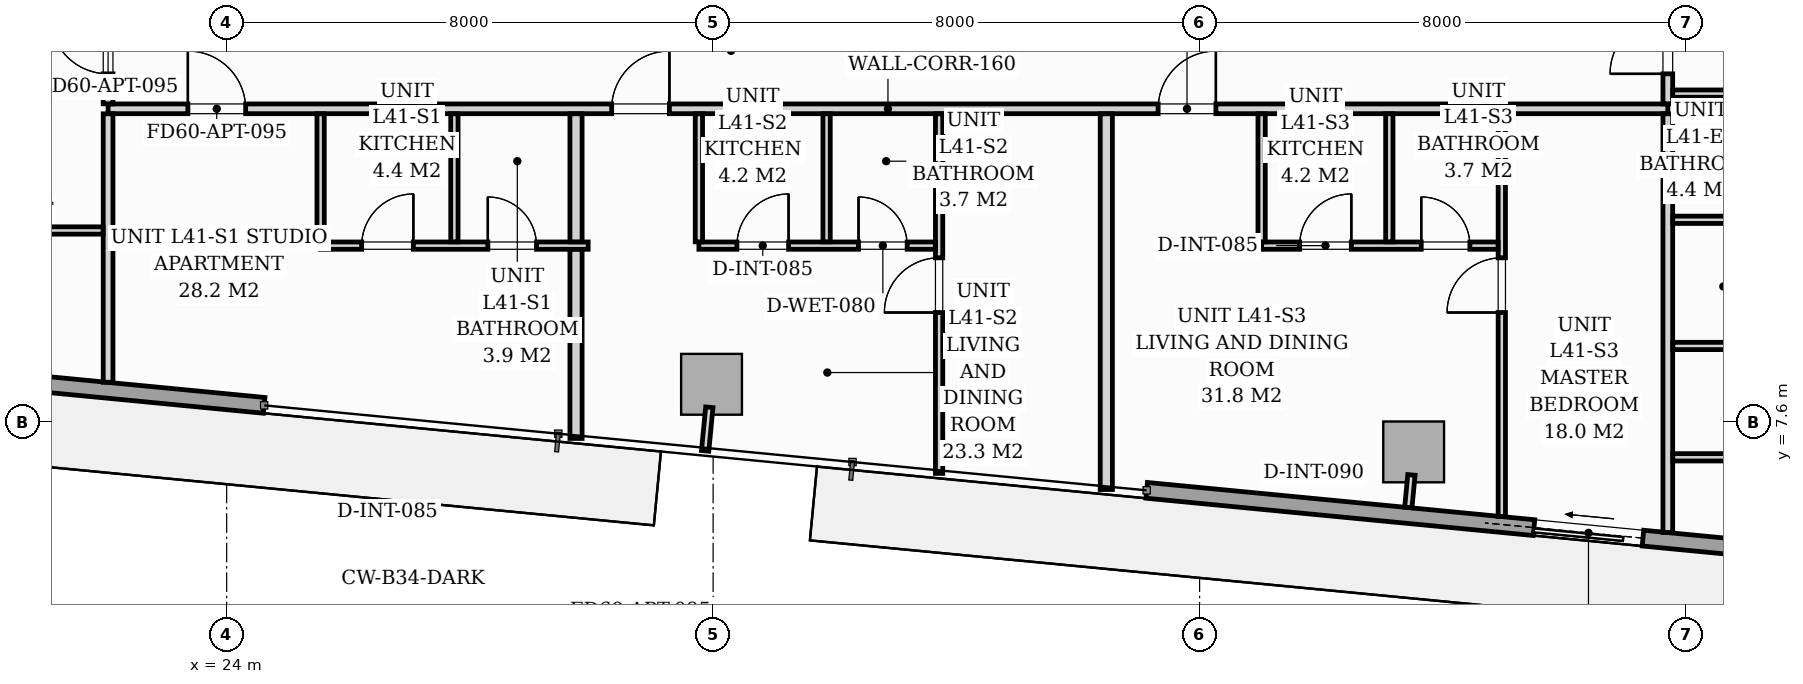
"""IFC4 building model, lengths in metres.
Left out: names, types, materials, properties, quantities, classifications, styles, units other than length and angle.
Written with IfcOpenShell. Run it as: python <this file> out.ifc"""

import sys

from ifc_helpers import new_model, si_unit, direction, frame, frame_2d, origin, origin_2d, place, context, subcontext, project, spatial, rectangle, extrude, source, transform, mapped, element, fill, save


model = new_model("IFC4")
c1 = context("Model", 3, precision=1e-05, world=origin(), true_north=direction((0.0, 1.0)))
c2 = subcontext(c1, "Body", "Model", "MODEL_VIEW")
j1 = project(units=[si_unit("LENGTHUNIT", "METRE"), si_unit("PLANEANGLEUNIT", "RADIAN")], contexts=[c1])
p1 = place(None, origin())
s1 = spatial("IfcSite", under=j1, at=p1, CompositionType="ELEMENT")
p2 = place(p1, origin())
s2 = spatial("IfcBuilding", under=s1, at=p2, CompositionType="ELEMENT")
p3 = place(p2, frame((0.0, 0.0, 143.8)))
s3 = spatial("IfcBuildingStorey", under=s2, at=p3, CompositionType="ELEMENT", Elevation=143.8)
m1 = source(origin(), c2, "Body", "SweptSolid", [
    extrude(rectangle(XDim=1.0, YDim=1.0, at=origin_2d()), origin(), (0.0, 0.0, 1.0), 3.196),
])
for number, where, z_axis, x_axis in (
    (1, (31.974, 8.22, 0.002), (0.0, 0.0, 1.0), (0.995, -0.096, 0.0)),
    (2, (43.521, 7.108, 0.002), (0.0, 0.0, 1.0), (0.995, -0.096, 0.0)),
):
    element("IfcColumn", number, at=place(p3, frame(where, z_axis=z_axis, x_axis=x_axis)), inside=s3, PredefinedType="COLUMN", context=c2, shape_type="MappedRepresentation", body=[
        mapped(m1, transform((0.0, 0.0, 0.0), scale=1.0)),
    ])
p4 = place(p3, frame((56.061, 4.845, 0.0), z_axis=(0.0, 0.0, 1.0), x_axis=(-0.995395976631, 0.095848055311, 0.0)))
e3 = element("IfcWall", 3, at=p4, inside=s3, PredefinedType="STANDARD", context=c2, shape_type="SweptSolid", body=[
    extrude(rectangle(XDim=17.01, YDim=0.26, at=frame_2d((8.505, 0.0))), origin(), (0.0, 0.0, 1.0), 2.94),
])
p5 = place(p4, frame((8.811, 0.0, 0.0)))
e4 = element("IfcOpeningElement", 4, at=p5, cuts=e3, PredefinedType="OPENING", context=c2, shape_type="SweptSolid", body=[
    extrude(rectangle(XDim=1.8, YDim=2.06, at=frame_2d((0.9, 1.03))), frame((0.0, 0.14, 0.0), z_axis=(0.0, -1.0, 0.0), x_axis=(1.0, 0.0, 0.0)), (0.0, 0.0, 1.0), 0.28),
])
p6 = place(p4, frame((2.05, 0.0, 0.65)))
e5 = element("IfcOpeningElement", 5, at=p6, cuts=e3, PredefinedType="OPENING", context=c2, shape_type="SweptSolid", body=[
    extrude(rectangle(XDim=1.6, YDim=1.5, at=frame_2d((0.8, 0.75))), frame((0.0, 0.14, 0.0), z_axis=(0.0, -1.0, 0.0), x_axis=(1.0, 0.0, 0.0)), (0.0, 0.0, 1.0), 0.28),
])
p7 = place(p3, frame((24.617, 7.873, 0.0), z_axis=(0.0, 0.0, 1.0), x_axis=(-0.995395976631, 0.095848055311, 0.0)))
e6 = element("IfcWall", 6, at=p7, inside=s3, PredefinedType="STANDARD", context=c2, shape_type="SweptSolid", body=[
    extrude(rectangle(XDim=17.01, YDim=0.26, at=frame_2d((8.505, 0.0))), origin(), (0.0, 0.0, 1.0), 2.94),
])
p8 = place(p7, frame((7.21, 0.0, 0.0)))
e7 = element("IfcOpeningElement", 7, at=p8, cuts=e6, PredefinedType="OPENING", context=c2, shape_type="SweptSolid", body=[
    extrude(rectangle(XDim=1.8, YDim=2.06, at=frame_2d((0.9, 1.03))), frame((0.0, 0.14, 0.0), z_axis=(0.0, -1.0, 0.0), x_axis=(1.0, 0.0, 0.0)), (0.0, 0.0, 1.0), 0.28),
])
p9 = place(p7, frame((9.7, 0.0, 0.65)))
e8 = element("IfcOpeningElement", 8, at=p9, cuts=e6, PredefinedType="OPENING", context=c2, shape_type="SweptSolid", body=[
    extrude(rectangle(XDim=1.6, YDim=1.5, at=frame_2d((0.8, 0.75))), frame((0.0, 0.14, 0.0), z_axis=(0.0, -1.0, 0.0), x_axis=(1.0, 0.0, 0.0)), (0.0, 0.0, 1.0), 0.28),
])
p10 = place(p3, frame((22.05, 12.75, 0.0), z_axis=(0.0, 0.0, 1.0), x_axis=(1.0, 0.0, 0.0)))
e9 = element("IfcWall", 9, at=p10, inside=s3, PredefinedType="PARTITIONING", context=c2, shape_type="SweptSolid", body=[
    extrude(rectangle(XDim=25.65, YDim=0.16, at=frame_2d((12.825, 0.0))), origin(), (0.0, 0.0, 1.0), 2.94),
])
p11 = place(p10, frame((1.312, 0.0, 0.0)))
e10 = element("IfcOpeningElement", 10, at=p11, cuts=e9, PredefinedType="OPENING", context=c2, shape_type="SweptSolid", body=[
    extrude(rectangle(XDim=0.95, YDim=2.06, at=frame_2d((0.475, 1.03))), frame((0.0, 0.09, 0.0), z_axis=(0.0, -1.0, 0.0), x_axis=(1.0, 0.0, 0.0)), (0.0, 0.0, 1.0), 0.18),
])
p12 = place(p10, frame((8.281, 0.0, 0.0)))
e11 = element("IfcOpeningElement", 11, at=p12, cuts=e9, PredefinedType="OPENING", context=c2, shape_type="SweptSolid", body=[
    extrude(rectangle(XDim=0.95, YDim=2.06, at=frame_2d((0.475, 1.03))), frame((0.0, 0.09, 0.0), z_axis=(0.0, -1.0, 0.0), x_axis=(1.0, 0.0, 0.0)), (0.0, 0.0, 1.0), 0.18),
])
p13 = place(p10, frame((17.268, 0.0, 0.0)))
e12 = element("IfcOpeningElement", 12, at=p13, cuts=e9, PredefinedType="OPENING", context=c2, shape_type="SweptSolid", body=[
    extrude(rectangle(XDim=0.95, YDim=2.06, at=frame_2d((0.475, 1.03))), frame((0.0, 0.09, 0.0), z_axis=(0.0, -1.0, 0.0), x_axis=(1.0, 0.0, 0.0)), (0.0, 0.0, 1.0), 0.18),
])
p14 = place(p3, frame((22.05, 8.253, 0.0), z_axis=(0.0, 0.0, 1.0), x_axis=(0.0, 1.0, 0.0)))
e13 = element("IfcWall", 13, at=p14, inside=s3, PredefinedType="PARTITIONING", context=c2, shape_type="SweptSolid", body=[
    extrude(rectangle(XDim=4.415, YDim=0.16, at=frame_2d((2.208, 0.0))), origin(), (0.0, 0.0, 1.0), 2.94),
])
p15 = place(p3, frame((22.05, 12.832, 0.0), z_axis=(0.0, 0.0, 1.0), x_axis=(0.0, 1.0, 0.0)))
e14 = element("IfcWall", 14, at=p15, inside=s3, PredefinedType="PARTITIONING", context=c2, shape_type="SweptSolid", body=[
    extrude(rectangle(XDim=14.585, YDim=0.16, at=frame_2d((7.292, 0.0))), origin(), (0.0, 0.0, 1.0), 2.94),
])
p16 = place(p15, frame((0.493, 0.0, 0.0)))
e15 = element("IfcOpeningElement", 15, at=p16, cuts=e14, PredefinedType="OPENING", context=c2, shape_type="SweptSolid", body=[
    extrude(rectangle(XDim=0.95, YDim=2.06, at=frame_2d((0.475, 1.03))), frame((0.0, 0.09, 0.0), z_axis=(0.0, -1.0, 0.0), x_axis=(1.0, 0.0, 0.0)), (0.0, 0.0, 1.0), 0.18),
])
p17 = place(p3, frame((47.7, 5.783, 0.0), z_axis=(0.0, 0.0, 1.0), x_axis=(0.0, 1.0, 0.0)))
e16 = element("IfcWall", 16, at=p17, inside=s3, PredefinedType="PARTITIONING", context=c2, shape_type="SweptSolid", body=[
    extrude(rectangle(XDim=6.885, YDim=0.16, at=frame_2d((3.442, 0.0))), origin(), (0.0, 0.0, 1.0), 2.94),
])
p18 = place(p3, frame((47.7, 12.832, 0.0), z_axis=(0.0, 0.0, 1.0), x_axis=(0.0, 1.0, 0.0)))
e17 = element("IfcWall", 17, at=p18, inside=s3, PredefinedType="PARTITIONING", context=c2, shape_type="SweptSolid", body=[
    extrude(rectangle(XDim=7.818, YDim=0.16, at=frame_2d((3.909, 0.0))), origin(), (0.0, 0.0, 1.0), 2.94),
])
p19 = place(p18, frame((0.493, 0.0, 0.0)))
e18 = element("IfcOpeningElement", 18, at=p19, cuts=e17, PredefinedType="OPENING", context=c2, shape_type="SweptSolid", body=[
    extrude(rectangle(XDim=0.95, YDim=2.06, at=frame_2d((0.475, 1.03))), frame((0.0, 0.09, 0.0), z_axis=(0.0, -1.0, 0.0), x_axis=(1.0, 0.0, 0.0)), (0.0, 0.0, 1.0), 0.18),
])
p20 = place(p18, frame((5.313, 0.0, 0.0)))
e19 = element("IfcOpeningElement", 19, at=p20, cuts=e17, PredefinedType="OPENING", context=c2, shape_type="SweptSolid", body=[
    extrude(rectangle(XDim=0.95, YDim=2.06, at=frame_2d((0.475, 1.03))), frame((0.0, 0.09, 0.0), z_axis=(0.0, -1.0, 0.0), x_axis=(1.0, 0.0, 0.0)), (0.0, 0.0, 1.0), 0.18),
])
p21 = place(p3, frame((25.545, 10.5, 0.0), z_axis=(0.0, 0.0, 1.0), x_axis=(1.0, 0.0, 0.0)))
e20 = element("IfcWall", 20, at=p21, inside=s3, PredefinedType="PARTITIONING", context=c2, shape_type="SweptSolid", body=[
    extrude(rectangle(XDim=4.4, YDim=0.12, at=frame_2d((2.2, 0.0))), origin(), (0.0, 0.0, 1.0), 2.94),
])
p22 = place(p21, frame((0.675, 0.0, 0.0)))
e21 = element("IfcOpeningElement", 21, at=p22, cuts=e20, PredefinedType="OPENING", context=c2, shape_type="SweptSolid", body=[
    extrude(rectangle(XDim=0.85, YDim=2.05, at=frame_2d((0.425, 1.025))), frame((0.0, 0.07, 0.0), z_axis=(0.0, -1.0, 0.0), x_axis=(1.0, 0.0, 0.0)), (0.0, 0.0, 1.0), 0.14),
])
p23 = place(p21, frame((2.75, 0.0, 0.0)))
e22 = element("IfcOpeningElement", 22, at=p23, cuts=e20, PredefinedType="OPENING", context=c2, shape_type="SweptSolid", body=[
    extrude(rectangle(XDim=0.8, YDim=2.02, at=frame_2d((0.4, 1.01))), frame((0.0, 0.07, 0.0), z_axis=(0.0, -1.0, 0.0), x_axis=(1.0, 0.0, 0.0)), (0.0, 0.0, 1.0), 0.14),
])
for number, where, z_axis, x_axis in (
    (23, (25.545, 10.562, 0.0), (0.0, 0.0, 1.0), (0.0, 1.0, 0.0)),
    (24, (27.745, 10.562, 0.0), (0.0, 0.0, 1.0), (0.0, 1.0, 0.0)),
):
    element("IfcWall", number, at=place(p3, frame(where, z_axis=z_axis, x_axis=x_axis)), inside=s3, PredefinedType="PARTITIONING", context=c2, shape_type="SweptSolid", body=[
        extrude(rectangle(XDim=2.106, YDim=0.12, at=frame_2d((1.053, 0.0))), origin(), (0.0, 0.0, 1.0), 2.94),
    ])
p24 = place(p3, frame((29.745, 7.329, 0.0), z_axis=(0.0, 0.0, 1.0), x_axis=(0.0, 1.0, 0.0)))
e25 = element("IfcWall", 25, at=p24, inside=s3, PredefinedType="PARTITIONING", context=c2, shape_type="SweptSolid", body=[
    extrude(rectangle(XDim=3.109, YDim=0.2, at=frame_2d((1.554, 0.0))), origin(), (0.0, 0.0, 1.0), 2.94),
])
p25 = place(p3, frame((29.745, 10.562, 0.0), z_axis=(0.0, 0.0, 1.0), x_axis=(0.0, 1.0, 0.0)))
e26 = element("IfcWall", 26, at=p25, inside=s3, PredefinedType="PARTITIONING", context=c2, shape_type="SweptSolid", body=[
    extrude(rectangle(XDim=2.106, YDim=0.2, at=frame_2d((1.053, 0.0))), origin(), (0.0, 0.0, 1.0), 2.94),
])
p26 = place(p3, frame((35.716, 6.754, 0.0), z_axis=(0.0, 0.0, 1.0), x_axis=(0.0, 1.0, 0.0)))
e27 = element("IfcWall", 27, at=p26, inside=s3, PredefinedType="PARTITIONING", context=c2, shape_type="SweptSolid", body=[
    extrude(rectangle(XDim=5.914, YDim=0.12, at=frame_2d((2.957, 0.0))), origin(), (0.0, 0.0, 1.0), 2.94),
])
p27 = place(p26, frame((2.646, 0.0, 0.0)))
e28 = element("IfcOpeningElement", 28, at=p27, cuts=e27, PredefinedType="OPENING", context=c2, shape_type="SweptSolid", body=[
    extrude(rectangle(XDim=0.9, YDim=2.05, at=frame_2d((0.45, 1.025))), frame((0.0, 0.07, 0.0), z_axis=(0.0, -1.0, 0.0), x_axis=(1.0, 0.0, 0.0)), (0.0, 0.0, 1.0), 0.14),
])
p28 = place(p3, frame((31.766, 10.5, 0.0), z_axis=(0.0, 0.0, 1.0), x_axis=(1.0, 0.0, 0.0)))
e29 = element("IfcWall", 29, at=p28, inside=s3, PredefinedType="PARTITIONING", context=c2, shape_type="SweptSolid", body=[
    extrude(rectangle(XDim=3.888, YDim=0.12, at=frame_2d((1.944, 0.0))), origin(), (0.0, 0.0, 1.0), 2.94),
])
p29 = place(p28, frame((0.625, 0.0, 0.0)))
e30 = element("IfcOpeningElement", 30, at=p29, cuts=e29, PredefinedType="OPENING", context=c2, shape_type="SweptSolid", body=[
    extrude(rectangle(XDim=0.85, YDim=2.05, at=frame_2d((0.425, 1.025))), frame((0.0, 0.07, 0.0), z_axis=(0.0, -1.0, 0.0), x_axis=(1.0, 0.0, 0.0)), (0.0, 0.0, 1.0), 0.14),
])
p30 = place(p28, frame((2.625, 0.0, 0.0)))
e31 = element("IfcOpeningElement", 31, at=p30, cuts=e29, PredefinedType="OPENING", context=c2, shape_type="SweptSolid", body=[
    extrude(rectangle(XDim=0.8, YDim=2.02, at=frame_2d((0.4, 1.01))), frame((0.0, 0.07, 0.0), z_axis=(0.0, -1.0, 0.0), x_axis=(1.0, 0.0, 0.0)), (0.0, 0.0, 1.0), 0.14),
])
for number, where, z_axis, x_axis in (
    (32, (33.866, 10.562, 0.0), (0.0, 0.0, 1.0), (0.0, 1.0, 0.0)),
    (33, (31.766, 10.562, 0.0), (0.0, 0.0, 1.0), (0.0, 1.0, 0.0)),
):
    element("IfcWall", number, at=place(p3, frame(where, z_axis=z_axis, x_axis=x_axis)), inside=s3, PredefinedType="PARTITIONING", context=c2, shape_type="SweptSolid", body=[
        extrude(rectangle(XDim=2.106, YDim=0.12, at=frame_2d((1.053, 0.0))), origin(), (0.0, 0.0, 1.0), 2.94),
    ])
p31 = place(p3, frame((38.466, 6.49, 0.0), z_axis=(0.0, 0.0, 1.0), x_axis=(0.0, 1.0, 0.0)))
e34 = element("IfcWall", 34, at=p31, inside=s3, PredefinedType="PARTITIONING", context=c2, shape_type="SweptSolid", body=[
    extrude(rectangle(XDim=6.178, YDim=0.2, at=frame_2d((3.089, 0.0))), origin(), (0.0, 0.0, 1.0), 2.94),
])
p32 = place(p3, frame((44.97, 6.046, 0.0), z_axis=(0.0, 0.0, 1.0), x_axis=(0.0, 1.0, 0.0)))
e35 = element("IfcWall", 35, at=p32, inside=s3, PredefinedType="PARTITIONING", context=c2, shape_type="SweptSolid", body=[
    extrude(rectangle(XDim=6.622, YDim=0.12, at=frame_2d((3.311, 0.0))), origin(), (0.0, 0.0, 1.0), 2.94),
])
p33 = place(p32, frame((3.354, 0.0, 0.0)))
e36 = element("IfcOpeningElement", 36, at=p33, cuts=e35, PredefinedType="OPENING", context=c2, shape_type="SweptSolid", body=[
    extrude(rectangle(XDim=0.9, YDim=2.05, at=frame_2d((0.45, 1.025))), frame((0.0, 0.07, 0.0), z_axis=(0.0, -1.0, 0.0), x_axis=(1.0, 0.0, 0.0)), (0.0, 0.0, 1.0), 0.14),
])
p34 = place(p3, frame((41.02, 10.5, 0.0), z_axis=(0.0, 0.0, 1.0), x_axis=(1.0, 0.0, 0.0)))
e37 = element("IfcWall", 37, at=p34, inside=s3, PredefinedType="PARTITIONING", context=c2, shape_type="SweptSolid", body=[
    extrude(rectangle(XDim=3.888, YDim=0.12, at=frame_2d((1.944, 0.0))), origin(), (0.0, 0.0, 1.0), 2.94),
])
p35 = place(p34, frame((0.625, 0.0, 0.0)))
e38 = element("IfcOpeningElement", 38, at=p35, cuts=e37, PredefinedType="OPENING", context=c2, shape_type="SweptSolid", body=[
    extrude(rectangle(XDim=0.85, YDim=2.05, at=frame_2d((0.425, 1.025))), frame((0.0, 0.07, 0.0), z_axis=(0.0, -1.0, 0.0), x_axis=(1.0, 0.0, 0.0)), (0.0, 0.0, 1.0), 0.14),
])
p36 = place(p34, frame((2.625, 0.0, 0.0)))
e39 = element("IfcOpeningElement", 39, at=p36, cuts=e37, PredefinedType="OPENING", context=c2, shape_type="SweptSolid", body=[
    extrude(rectangle(XDim=0.8, YDim=2.02, at=frame_2d((0.4, 1.01))), frame((0.0, 0.07, 0.0), z_axis=(0.0, -1.0, 0.0), x_axis=(1.0, 0.0, 0.0)), (0.0, 0.0, 1.0), 0.14),
])
for number, where, z_axis, x_axis in (
    (40, (43.12, 10.562, 0.0), (0.0, 0.0, 1.0), (0.0, 1.0, 0.0)),
    (41, (41.02, 10.562, 0.0), (0.0, 0.0, 1.0), (0.0, 1.0, 0.0)),
):
    element("IfcWall", number, at=place(p3, frame(where, z_axis=z_axis, x_axis=x_axis)), inside=s3, PredefinedType="PARTITIONING", context=c2, shape_type="SweptSolid", body=[
        extrude(rectangle(XDim=2.106, YDim=0.12, at=frame_2d((1.053, 0.0))), origin(), (0.0, 0.0, 1.0), 2.94),
    ])
p37 = place(p3, frame((8.406, 10.749, 0.0), z_axis=(0.0, 0.0, 1.0), x_axis=(1.0, 0.0, 0.0)))
e42 = element("IfcWall", 42, at=p37, inside=s3, PredefinedType="PARTITIONING", context=c2, shape_type="SweptSolid", body=[
    extrude(rectangle(XDim=13.562, YDim=0.12, at=frame_2d((6.781, 0.0))), origin(), (0.0, 0.0, 1.0), 2.94),
])
p38 = place(p37, frame((7.44, 0.0, 0.0)))
e43 = element("IfcOpeningElement", 43, at=p38, cuts=e42, PredefinedType="OPENING", context=c2, shape_type="SweptSolid", body=[
    extrude(rectangle(XDim=0.85, YDim=2.05, at=frame_2d((0.425, 1.025))), frame((0.0, 0.07, 0.0), z_axis=(0.0, -1.0, 0.0), x_axis=(1.0, 0.0, 0.0)), (0.0, 0.0, 1.0), 0.14),
])
for number, where, z_axis, x_axis in (
    (44, (47.782, 10.925, 0.0), (0.0, 0.0, 1.0), (1.0, 0.0, 0.0)),
    (45, (47.782, 8.85, 0.0), (0.0, 0.0, 1.0), (1.0, 0.0, 0.0)),
    (46, (47.782, 13.0, 0.0), (0.0, 0.0, 1.0), (1.0, 0.0, 0.0)),
):
    element("IfcWall", number, at=place(p3, frame(where, z_axis=z_axis, x_axis=x_axis)), inside=s3, PredefinedType="PARTITIONING", context=c2, shape_type="SweptSolid", body=[
        extrude(rectangle(XDim=2.256, YDim=0.12, at=frame_2d((1.128, 0.0))), origin(), (0.0, 0.0, 1.0), 2.94),
    ])
p39 = place(p3, frame((47.782, 7.019, 0.0), z_axis=(0.0, 0.0, 1.0), x_axis=(1.0, 0.0, 0.0)))
e47 = element("IfcWall", 47, at=p39, inside=s3, PredefinedType="PARTITIONING", context=c2, shape_type="SweptSolid", body=[
    extrude(rectangle(XDim=8.682, YDim=0.12, at=frame_2d((4.341, 0.0))), origin(), (0.0, 0.0, 1.0), 2.94),
])
p40 = place(p39, frame((3.916, 0.0, 0.0)))
e48 = element("IfcOpeningElement", 48, at=p40, cuts=e47, PredefinedType="OPENING", context=c2, shape_type="SweptSolid", body=[
    extrude(rectangle(XDim=0.85, YDim=2.05, at=frame_2d((0.425, 1.025))), frame((0.0, 0.07, 0.0), z_axis=(0.0, -1.0, 0.0), x_axis=(1.0, 0.0, 0.0)), (0.0, 0.0, 1.0), 0.14),
])
p41 = place(p3, frame((31.938, 7.841, 0.0), z_axis=(0.0, 0.0, 1.0), x_axis=(-0.095977354523, -0.995383517755, 0.0)))
e49 = element("IfcWall", 49, at=p41, inside=s3, PredefinedType="PARTITIONING", context=c2, shape_type="SweptSolid", body=[
    extrude(rectangle(XDim=0.72, YDim=0.12, at=frame_2d((0.36, 0.0))), origin(), (0.0, 0.0, 1.0), 2.94),
])
p42 = place(p3, frame((43.484, 6.729, 0.0), z_axis=(0.0, 0.0, 1.0), x_axis=(-0.095772948675, -0.995403205893, 0.0)))
e50 = element("IfcWall", 50, at=p42, inside=s3, PredefinedType="PARTITIONING", context=c2, shape_type="SweptSolid", body=[
    extrude(rectangle(XDim=0.538, YDim=0.12, at=frame_2d((0.269, 0.0))), origin(), (0.0, 0.0, 1.0), 2.94),
])
m2 = source(origin(), c2, "Body", "SweptSolid", [
    extrude(rectangle(XDim=1.8, YDim=2.06, at=frame_2d((0.9, 1.03))), frame((0.0, 0.025, 0.0), z_axis=(0.0, -1.0, 0.0), x_axis=(1.0, 0.0, 0.0)), (0.0, 0.0, 1.0), 0.05),
])
p43 = place(p5, origin())
e51 = element("IfcDoor", 51, at=p43, inside=s3, OperationType="SLIDING_TO_RIGHT", PredefinedType="DOOR", context=c2, shape_type="MappedRepresentation", body=[
    mapped(m2, transform((0.0, 0.0, 0.0), scale=1.0)),
])
fill(e4, e51)
m3 = source(origin(), c2, "Body", "SweptSolid", [
    extrude(rectangle(XDim=0.95, YDim=2.06, at=frame_2d((0.475, 1.03))), frame((0.0, 0.025, 0.0), z_axis=(0.0, -1.0, 0.0), x_axis=(1.0, 0.0, 0.0)), (0.0, 0.0, 1.0), 0.05),
])
p44 = place(p11, origin())
e52 = element("IfcDoor", 52, at=p44, inside=s3, OperationType="SINGLE_SWING_LEFT", PredefinedType="DOOR", context=c2, shape_type="MappedRepresentation", body=[
    mapped(m3, transform((0.0, 0.0, 0.0), scale=1.0)),
])
fill(e10, e52)
m4 = source(origin(), c2, "Body", "SweptSolid", [
    extrude(rectangle(XDim=0.85, YDim=2.05, at=frame_2d((0.425, 1.025))), frame((0.0, 0.025, 0.0), z_axis=(0.0, -1.0, 0.0), x_axis=(1.0, 0.0, 0.0)), (0.0, 0.0, 1.0), 0.05),
])
p45 = place(p22, origin())
e53 = element("IfcDoor", 53, at=p45, inside=s3, OperationType="SINGLE_SWING_RIGHT", PredefinedType="DOOR", context=c2, shape_type="MappedRepresentation", body=[
    mapped(m4, transform((0.0, 0.0, 0.0), scale=1.0)),
])
fill(e21, e53)
m5 = source(origin(), c2, "Body", "SweptSolid", [
    extrude(rectangle(XDim=0.8, YDim=2.02, at=frame_2d((0.4, 1.01))), frame((0.0, 0.025, 0.0), z_axis=(0.0, -1.0, 0.0), x_axis=(1.0, 0.0, 0.0)), (0.0, 0.0, 1.0), 0.05),
])
p46 = place(p23, origin())
e54 = element("IfcDoor", 54, at=p46, inside=s3, OperationType="SINGLE_SWING_LEFT", PredefinedType="DOOR", context=c2, shape_type="MappedRepresentation", body=[
    mapped(m5, transform((0.0, 0.0, 0.0), scale=1.0)),
])
fill(e22, e54)
p47 = place(p12, origin())
e55 = element("IfcDoor", 55, at=p47, inside=s3, OperationType="SINGLE_SWING_RIGHT", PredefinedType="DOOR", context=c2, shape_type="MappedRepresentation", body=[
    mapped(m3, transform((0.0, 0.0, 0.0), scale=1.0)),
])
fill(e11, e55)
m6 = source(origin(), c2, "Body", "SweptSolid", [
    extrude(rectangle(XDim=0.9, YDim=2.05, at=frame_2d((0.45, 1.025))), frame((0.0, 0.025, 0.0), z_axis=(0.0, -1.0, 0.0), x_axis=(1.0, 0.0, 0.0)), (0.0, 0.0, 1.0), 0.05),
])
p48 = place(p27, origin())
e56 = element("IfcDoor", 56, at=p48, inside=s3, OperationType="SINGLE_SWING_LEFT", PredefinedType="DOOR", context=c2, shape_type="MappedRepresentation", body=[
    mapped(m6, transform((0.0, 0.0, 0.0), scale=1.0)),
])
fill(e28, e56)
p49 = place(p29, origin())
e57 = element("IfcDoor", 57, at=p49, inside=s3, OperationType="SINGLE_SWING_RIGHT", PredefinedType="DOOR", context=c2, shape_type="MappedRepresentation", body=[
    mapped(m4, transform((0.0, 0.0, 0.0), scale=1.0)),
])
fill(e30, e57)
p50 = place(p30, origin())
e58 = element("IfcDoor", 58, at=p50, inside=s3, OperationType="SINGLE_SWING_LEFT", PredefinedType="DOOR", context=c2, shape_type="MappedRepresentation", body=[
    mapped(m5, transform((0.0, 0.0, 0.0), scale=1.0)),
])
fill(e31, e58)
p51 = place(p13, origin())
e59 = element("IfcDoor", 59, at=p51, inside=s3, OperationType="SINGLE_SWING_RIGHT", PredefinedType="DOOR", context=c2, shape_type="MappedRepresentation", body=[
    mapped(m3, transform((0.0, 0.0, 0.0), scale=1.0)),
])
fill(e12, e59)
p52 = place(p33, origin())
e60 = element("IfcDoor", 60, at=p52, inside=s3, OperationType="SINGLE_SWING_LEFT", PredefinedType="DOOR", context=c2, shape_type="MappedRepresentation", body=[
    mapped(m6, transform((0.0, 0.0, 0.0), scale=1.0)),
])
fill(e36, e60)
p53 = place(p35, origin())
e61 = element("IfcDoor", 61, at=p53, inside=s3, OperationType="SINGLE_SWING_RIGHT", PredefinedType="DOOR", context=c2, shape_type="MappedRepresentation", body=[
    mapped(m4, transform((0.0, 0.0, 0.0), scale=1.0)),
])
fill(e38, e61)
p54 = place(p36, origin())
e62 = element("IfcDoor", 62, at=p54, inside=s3, OperationType="SINGLE_SWING_LEFT", PredefinedType="DOOR", context=c2, shape_type="MappedRepresentation", body=[
    mapped(m5, transform((0.0, 0.0, 0.0), scale=1.0)),
])
fill(e39, e62)
p55 = place(p16, origin())
e63 = element("IfcDoor", 63, at=p55, inside=s3, OperationType="SINGLE_SWING_RIGHT", PredefinedType="DOOR", context=c2, shape_type="MappedRepresentation", body=[
    mapped(m3, transform((0.0, 0.0, 0.0), scale=1.0)),
])
fill(e15, e63)
p56 = place(p19, origin())
e64 = element("IfcDoor", 64, at=p56, inside=s3, OperationType="SINGLE_SWING_LEFT", PredefinedType="DOOR", context=c2, shape_type="MappedRepresentation", body=[
    mapped(m3, transform((0.0, 0.0, 0.0), scale=1.0)),
])
fill(e18, e64)
save(model, sys.argv[1])
